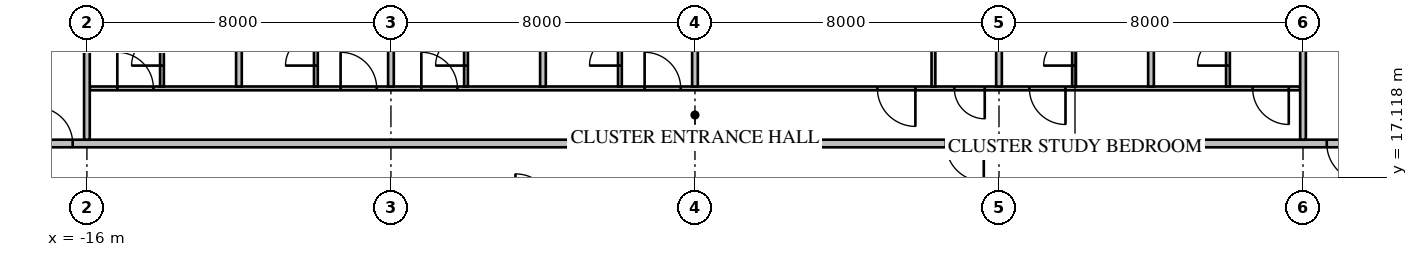
"""IFC4 building model, lengths in metres.
Left out: names, types, materials, properties, quantities, classifications, styles, units other than length and angle.
Written with IfcOpenShell. Run it as: python <this file> out.ifc"""

import sys

from ifc_helpers import new_model, si_unit, direction, frame, frame_2d, origin, place, context, subcontext, project, spatial, rectangle, extrude, element, fill, save


model = new_model("IFC4")
c1 = context("Model", 3, precision=1e-05, world=origin(), true_north=direction((0.0, 1.0)))
c2 = subcontext(c1, "Body", "Model", "MODEL_VIEW")
j1 = project(units=[si_unit("LENGTHUNIT", "METRE"), si_unit("PLANEANGLEUNIT", "RADIAN")], contexts=[c1])
p1 = place(None, origin())
s1 = spatial("IfcSite", under=j1, at=p1, CompositionType="ELEMENT")
p2 = place(p1, origin())
s2 = spatial("IfcBuilding", under=s1, at=p2, CompositionType="ELEMENT")
p3 = place(p2, frame((0.0, 0.0, 35.25)))
s3 = spatial("IfcBuildingStorey", under=s2, at=p3, CompositionType="ELEMENT", Elevation=35.25)
p4 = place(p3, frame((18.0, 18.0, 0.0), z_axis=(0.0, 0.0, 1.0), x_axis=(-1.0, 0.0, 0.0)))
e1 = element("IfcWall", 1, at=p4, inside=s3, PredefinedType="PARTITIONING", context=c2, shape_type="SweptSolid", body=[
    extrude(rectangle(XDim=36.0, YDim=0.2, at=frame_2d((18.0, 0.0))), origin(), (0.0, 0.0, 1.0), 3.65),
])
p5 = place(p4, frame((10.4, 0.0, 0.0)))
e2 = element("IfcOpeningElement", 2, at=p5, cuts=e1, PredefinedType="OPENING", context=c2, shape_type="SweptSolid", body=[
    extrude(rectangle(XDim=1.0, YDim=2.1, at=frame_2d((0.5, 1.05))), frame((0.0, 0.12, 0.0), z_axis=(0.0, -1.0, 0.0), x_axis=(1.0, 0.0, 0.0)), (0.0, 0.0, 1.0), 0.24),
])
p6 = place(p4, frame((0.375, 0.0, 0.0)))
e3 = element("IfcOpeningElement", 3, at=p6, cuts=e1, PredefinedType="OPENING", context=c2, shape_type="SweptSolid", body=[
    extrude(rectangle(XDim=1.0, YDim=2.1, at=frame_2d((0.5, 1.05))), frame((0.0, 0.12, 0.0), z_axis=(0.0, -1.0, 0.0), x_axis=(1.0, 0.0, 0.0)), (0.0, 0.0, 1.0), 0.24),
])
p7 = place(p4, frame((34.375, 0.0, 0.0)))
e4 = element("IfcOpeningElement", 4, at=p7, cuts=e1, PredefinedType="OPENING", context=c2, shape_type="SweptSolid", body=[
    extrude(rectangle(XDim=0.95, YDim=2.1, at=frame_2d((0.475, 1.05))), frame((0.0, 0.12, 0.0), z_axis=(0.0, -1.0, 0.0), x_axis=(1.0, 0.0, 0.0)), (0.0, 0.0, 1.0), 0.24),
])
p8 = place(p3, frame((15.925, 19.45, 0.0), z_axis=(0.0, 0.0, 1.0), x_axis=(-1.0, 0.0, 0.0)))
e5 = element("IfcWall", 5, at=p8, inside=s3, PredefinedType="PARTITIONING", context=c2, shape_type="SweptSolid", body=[
    extrude(rectangle(XDim=31.85, YDim=0.1, at=frame_2d((15.925, 0.0))), origin(), (0.0, 0.0, 1.0), 3.65),
])
p9 = place(p8, frame((10.125, 0.0, 0.0)))
e6 = element("IfcOpeningElement", 6, at=p9, cuts=e5, PredefinedType="OPENING", context=c2, shape_type="SweptSolid", body=[
    extrude(rectangle(XDim=1.0, YDim=2.1, at=frame_2d((0.5, 1.05))), frame((0.0, 0.07, 0.0), z_axis=(0.0, -1.0, 0.0), x_axis=(1.0, 0.0, 0.0)), (0.0, 0.0, 1.0), 0.14),
])
p10 = place(p8, frame((8.3, 0.0, 0.0)))
e7 = element("IfcOpeningElement", 7, at=p10, cuts=e5, PredefinedType="OPENING", context=c2, shape_type="SweptSolid", body=[
    extrude(rectangle(XDim=0.8, YDim=2.1, at=frame_2d((0.4, 1.05))), frame((0.0, 0.07, 0.0), z_axis=(0.0, -1.0, 0.0), x_axis=(1.0, 0.0, 0.0)), (0.0, 0.0, 1.0), 0.14),
])
p11 = place(p8, frame((0.3, 0.0, 0.0)))
e8 = element("IfcOpeningElement", 8, at=p11, cuts=e5, PredefinedType="OPENING", context=c2, shape_type="SweptSolid", body=[
    extrude(rectangle(XDim=0.95, YDim=2.1, at=frame_2d((0.475, 1.05))), frame((0.0, 0.07, 0.0), z_axis=(0.0, -1.0, 0.0), x_axis=(1.0, 0.0, 0.0)), (0.0, 0.0, 1.0), 0.14),
])
p12 = place(p8, frame((6.175, 0.0, 0.0)))
e9 = element("IfcOpeningElement", 9, at=p12, cuts=e5, PredefinedType="OPENING", context=c2, shape_type="SweptSolid", body=[
    extrude(rectangle(XDim=0.95, YDim=2.1, at=frame_2d((0.475, 1.05))), frame((0.0, 0.07, 0.0), z_axis=(0.0, -1.0, 0.0), x_axis=(1.0, 0.0, 0.0)), (0.0, 0.0, 1.0), 0.14),
])
p13 = place(p8, frame((16.3, 0.0, 0.0)))
e10 = element("IfcOpeningElement", 10, at=p13, cuts=e5, PredefinedType="OPENING", context=c2, shape_type="SweptSolid", body=[
    extrude(rectangle(XDim=0.95, YDim=2.1, at=frame_2d((0.475, 1.05))), frame((0.0, 0.07, 0.0), z_axis=(0.0, -1.0, 0.0), x_axis=(1.0, 0.0, 0.0)), (0.0, 0.0, 1.0), 0.14),
])
p14 = place(p8, frame((22.175, 0.0, 0.0)))
e11 = element("IfcOpeningElement", 11, at=p14, cuts=e5, PredefinedType="OPENING", context=c2, shape_type="SweptSolid", body=[
    extrude(rectangle(XDim=0.95, YDim=2.1, at=frame_2d((0.475, 1.05))), frame((0.0, 0.07, 0.0), z_axis=(0.0, -1.0, 0.0), x_axis=(1.0, 0.0, 0.0)), (0.0, 0.0, 1.0), 0.14),
])
p15 = place(p8, frame((24.3, 0.0, 0.0)))
e12 = element("IfcOpeningElement", 12, at=p15, cuts=e5, PredefinedType="OPENING", context=c2, shape_type="SweptSolid", body=[
    extrude(rectangle(XDim=0.95, YDim=2.1, at=frame_2d((0.475, 1.05))), frame((0.0, 0.07, 0.0), z_axis=(0.0, -1.0, 0.0), x_axis=(1.0, 0.0, 0.0)), (0.0, 0.0, 1.0), 0.14),
])
p16 = place(p8, frame((30.175, 0.0, 0.0)))
e13 = element("IfcOpeningElement", 13, at=p16, cuts=e5, PredefinedType="OPENING", context=c2, shape_type="SweptSolid", body=[
    extrude(rectangle(XDim=0.95, YDim=2.1, at=frame_2d((0.475, 1.05))), frame((0.0, 0.07, 0.0), z_axis=(0.0, -1.0, 0.0), x_axis=(1.0, 0.0, 0.0)), (0.0, 0.0, 1.0), 0.14),
])
p17 = place(p3, frame((6.275, 19.5, 0.0), z_axis=(0.0, 0.0, 1.0), x_axis=(0.0, 1.0, 0.0)))
e14 = element("IfcWall", 14, at=p17, inside=s3, PredefinedType="PARTITIONING", context=c2, shape_type="SweptSolid", body=[
    extrude(rectangle(XDim=2.1, YDim=0.1, at=frame_2d((1.05, 0.0))), origin(), (0.0, 0.0, 1.0), 3.65),
])
p18 = place(p3, frame((16.0, 18.1, 0.0), z_axis=(0.0, 0.0, 1.0), x_axis=(0.0, 1.0, 0.0)))
e15 = element("IfcWall", 15, at=p18, inside=s3, PredefinedType="PARTITIONING", context=c2, shape_type="SweptSolid", body=[
    extrude(rectangle(XDim=6.589, YDim=0.15, at=frame_2d((3.295, 0.0))), origin(), (0.0, 0.0, 1.0), 3.65),
])
for number, where, z_axis, x_axis in (
    (16, (12.0, 19.5, 0.0), (0.0, 0.0, 1.0), (0.0, 1.0, 0.0)),
    (17, (8.0, 19.5, 0.0), (0.0, 0.0, 1.0), (0.0, 1.0, 0.0)),
):
    element("IfcWall", number, at=place(p3, frame(where, z_axis=z_axis, x_axis=x_axis)), inside=s3, PredefinedType="PARTITIONING", context=c2, shape_type="SweptSolid", body=[
        extrude(rectangle(XDim=5.2, YDim=0.15, at=frame_2d((2.6, 0.0))), origin(), (0.0, 0.0, 1.0), 3.65),
    ])
p19 = place(p3, frame((0.0, 19.5, 0.0), z_axis=(0.0, 0.0, 1.0), x_axis=(0.0, 1.0, 0.0)))
e18 = element("IfcWall", 18, at=p19, inside=s3, PredefinedType="PARTITIONING", context=c2, shape_type="SweptSolid", body=[
    extrude(rectangle(XDim=5.2, YDim=0.15, at=frame_2d((2.6, 0.0))), origin(), (0.0, 0.0, 1.0), 2.809),
])
for number, where, z_axis, x_axis in (
    (19, (-4.0, 19.5, 0.0), (0.0, 0.0, 1.0), (0.0, 1.0, 0.0)),
    (20, (-8.0, 19.5, 0.0), (0.0, 0.0, 1.0), (0.0, 1.0, 0.0)),
    (21, (-12.0, 19.5, 0.0), (0.0, 0.0, 1.0), (0.0, 1.0, 0.0)),
):
    element("IfcWall", number, at=place(p3, frame(where, z_axis=z_axis, x_axis=x_axis)), inside=s3, PredefinedType="PARTITIONING", context=c2, shape_type="SweptSolid", body=[
        extrude(rectangle(XDim=5.2, YDim=0.15, at=frame_2d((2.6, 0.0))), origin(), (0.0, 0.0, 1.0), 3.65),
    ])
p20 = place(p3, frame((-16.0, 18.1, 0.0), z_axis=(0.0, 0.0, 1.0), x_axis=(0.0, 1.0, 0.0)))
e22 = element("IfcWall", 22, at=p20, inside=s3, PredefinedType="PARTITIONING", context=c2, shape_type="SweptSolid", body=[
    extrude(rectangle(XDim=6.589, YDim=0.15, at=frame_2d((3.295, 0.0))), origin(), (0.0, 0.0, 1.0), 3.65),
])
p21 = place(p3, frame((14.025, 19.5, 0.0), z_axis=(0.0, 0.0, 1.0), x_axis=(0.0, 1.0, 0.0)))
e23 = element("IfcWall", 23, at=p21, inside=s3, PredefinedType="PARTITIONING", context=c2, shape_type="SweptSolid", body=[
    extrude(rectangle(XDim=2.0, YDim=0.1, at=frame_2d((1.0, 0.0))), origin(), (0.0, 0.0, 1.0), 3.65),
])
p22 = place(p21, frame((0.55, 0.0, 0.0)))
e24 = element("IfcOpeningElement", 24, at=p22, cuts=e23, PredefinedType="OPENING", context=c2, shape_type="SweptSolid", body=[
    extrude(rectangle(XDim=0.8, YDim=2.1, at=frame_2d((0.4, 1.05))), frame((0.0, 0.07, 0.0), z_axis=(0.0, -1.0, 0.0), x_axis=(1.0, 0.0, 0.0)), (0.0, 0.0, 1.0), 0.14),
])
p23 = place(p3, frame((9.975, 19.5, 0.0), z_axis=(0.0, 0.0, 1.0), x_axis=(0.0, 1.0, 0.0)))
e25 = element("IfcWall", 25, at=p23, inside=s3, PredefinedType="PARTITIONING", context=c2, shape_type="SweptSolid", body=[
    extrude(rectangle(XDim=2.0, YDim=0.1, at=frame_2d((1.0, 0.0))), origin(), (0.0, 0.0, 1.0), 3.65),
])
p24 = place(p23, frame((0.55, 0.0, 0.0)))
e26 = element("IfcOpeningElement", 26, at=p24, cuts=e25, PredefinedType="OPENING", context=c2, shape_type="SweptSolid", body=[
    extrude(rectangle(XDim=0.8, YDim=2.1, at=frame_2d((0.4, 1.05))), frame((0.0, 0.07, 0.0), z_axis=(0.0, -1.0, 0.0), x_axis=(1.0, 0.0, 0.0)), (0.0, 0.0, 1.0), 0.14),
])
p25 = place(p3, frame((-1.975, 19.5, 0.0), z_axis=(0.0, 0.0, 1.0), x_axis=(0.0, 1.0, 0.0)))
e27 = element("IfcWall", 27, at=p25, inside=s3, PredefinedType="PARTITIONING", context=c2, shape_type="SweptSolid", body=[
    extrude(rectangle(XDim=2.0, YDim=0.1, at=frame_2d((1.0, 0.0))), origin(), (0.0, 0.0, 1.0), 3.65),
])
p26 = place(p25, frame((0.55, 0.0, 0.0)))
e28 = element("IfcOpeningElement", 28, at=p26, cuts=e27, PredefinedType="OPENING", context=c2, shape_type="SweptSolid", body=[
    extrude(rectangle(XDim=0.8, YDim=2.1, at=frame_2d((0.4, 1.05))), frame((0.0, 0.07, 0.0), z_axis=(0.0, -1.0, 0.0), x_axis=(1.0, 0.0, 0.0)), (0.0, 0.0, 1.0), 0.14),
])
p27 = place(p3, frame((-6.025, 19.5, 0.0), z_axis=(0.0, 0.0, 1.0), x_axis=(0.0, 1.0, 0.0)))
e29 = element("IfcWall", 29, at=p27, inside=s3, PredefinedType="PARTITIONING", context=c2, shape_type="SweptSolid", body=[
    extrude(rectangle(XDim=2.0, YDim=0.1, at=frame_2d((1.0, 0.0))), origin(), (0.0, 0.0, 1.0), 3.65),
])
p28 = place(p27, frame((0.55, 0.0, 0.0)))
e30 = element("IfcOpeningElement", 30, at=p28, cuts=e29, PredefinedType="OPENING", context=c2, shape_type="SweptSolid", body=[
    extrude(rectangle(XDim=0.8, YDim=2.1, at=frame_2d((0.4, 1.05))), frame((0.0, 0.07, 0.0), z_axis=(0.0, -1.0, 0.0), x_axis=(1.0, 0.0, 0.0)), (0.0, 0.0, 1.0), 0.14),
])
p29 = place(p3, frame((-9.975, 19.5, 0.0), z_axis=(0.0, 0.0, 1.0), x_axis=(0.0, 1.0, 0.0)))
e31 = element("IfcWall", 31, at=p29, inside=s3, PredefinedType="PARTITIONING", context=c2, shape_type="SweptSolid", body=[
    extrude(rectangle(XDim=2.0, YDim=0.1, at=frame_2d((1.0, 0.0))), origin(), (0.0, 0.0, 1.0), 3.65),
])
p30 = place(p29, frame((0.55, 0.0, 0.0)))
e32 = element("IfcOpeningElement", 32, at=p30, cuts=e31, PredefinedType="OPENING", context=c2, shape_type="SweptSolid", body=[
    extrude(rectangle(XDim=0.8, YDim=2.1, at=frame_2d((0.4, 1.05))), frame((0.0, 0.07, 0.0), z_axis=(0.0, -1.0, 0.0), x_axis=(1.0, 0.0, 0.0)), (0.0, 0.0, 1.0), 0.14),
])
p31 = place(p3, frame((-14.025, 19.5, 0.0), z_axis=(0.0, 0.0, 1.0), x_axis=(0.0, 1.0, 0.0)))
e33 = element("IfcWall", 33, at=p31, inside=s3, PredefinedType="PARTITIONING", context=c2, shape_type="SweptSolid", body=[
    extrude(rectangle(XDim=2.0, YDim=0.1, at=frame_2d((1.0, 0.0))), origin(), (0.0, 0.0, 1.0), 3.65),
])
p32 = place(p31, frame((0.55, 0.0, 0.0)))
e34 = element("IfcOpeningElement", 34, at=p32, cuts=e33, PredefinedType="OPENING", context=c2, shape_type="SweptSolid", body=[
    extrude(rectangle(XDim=0.8, YDim=2.1, at=frame_2d((0.4, 1.05))), frame((0.0, 0.07, 0.0), z_axis=(0.0, -1.0, 0.0), x_axis=(1.0, 0.0, 0.0)), (0.0, 0.0, 1.0), 0.14),
])
p33 = place(p5, origin())
e35 = element("IfcDoor", 35, at=p33, inside=s3, OperationType="SINGLE_SWING_LEFT", PredefinedType="DOOR", context=c2, shape_type="SweptSolid", body=[
    extrude(rectangle(XDim=1.0, YDim=2.1, at=frame_2d((0.5, 1.05))), frame((0.0, 0.025, 0.0), z_axis=(0.0, -1.0, 0.0), x_axis=(1.0, 0.0, 0.0)), (0.0, 0.0, 1.0), 0.05),
])
fill(e2, e35)
p34 = place(p9, origin())
e36 = element("IfcDoor", 36, at=p34, inside=s3, OperationType="SINGLE_SWING_LEFT", PredefinedType="DOOR", context=c2, shape_type="SweptSolid", body=[
    extrude(rectangle(XDim=1.0, YDim=2.1, at=frame_2d((0.5, 1.05))), frame((0.0, 0.025, 0.0), z_axis=(0.0, -1.0, 0.0), x_axis=(1.0, 0.0, 0.0)), (0.0, 0.0, 1.0), 0.05),
])
fill(e6, e36)
p35 = place(p10, origin())
e37 = element("IfcDoor", 37, at=p35, inside=s3, OperationType="SINGLE_SWING_LEFT", PredefinedType="DOOR", context=c2, shape_type="SweptSolid", body=[
    extrude(rectangle(XDim=0.8, YDim=2.1, at=frame_2d((0.4, 1.05))), frame((0.0, 0.025, 0.0), z_axis=(0.0, -1.0, 0.0), x_axis=(1.0, 0.0, 0.0)), (0.0, 0.0, 1.0), 0.05),
])
fill(e7, e37)
p36 = place(p6, origin())
e38 = element("IfcDoor", 38, at=p36, inside=s3, OperationType="SINGLE_SWING_LEFT", PredefinedType="DOOR", context=c2, shape_type="SweptSolid", body=[
    extrude(rectangle(XDim=1.0, YDim=2.1, at=frame_2d((0.5, 1.05))), frame((0.0, 0.025, 0.0), z_axis=(0.0, -1.0, 0.0), x_axis=(1.0, 0.0, 0.0)), (0.0, 0.0, 1.0), 0.05),
])
fill(e3, e38)
p37 = place(p11, origin())
e39 = element("IfcDoor", 39, at=p37, inside=s3, OperationType="SINGLE_SWING_LEFT", PredefinedType="DOOR", context=c2, shape_type="SweptSolid", body=[
    extrude(rectangle(XDim=0.95, YDim=2.1, at=frame_2d((0.475, 1.05))), frame((0.0, 0.025, 0.0), z_axis=(0.0, -1.0, 0.0), x_axis=(1.0, 0.0, 0.0)), (0.0, 0.0, 1.0), 0.05),
])
fill(e8, e39)
p38 = place(p22, origin())
e40 = element("IfcDoor", 40, at=p38, inside=s3, OperationType="SINGLE_SWING_LEFT", PredefinedType="DOOR", context=c2, shape_type="SweptSolid", body=[
    extrude(rectangle(XDim=0.8, YDim=2.1, at=frame_2d((0.4, 1.05))), frame((0.0, 0.025, 0.0), z_axis=(0.0, -1.0, 0.0), x_axis=(1.0, 0.0, 0.0)), (0.0, 0.0, 1.0), 0.05),
])
fill(e24, e40)
p39 = place(p12, origin())
e41 = element("IfcDoor", 41, at=p39, inside=s3, OperationType="SINGLE_SWING_LEFT", PredefinedType="DOOR", context=c2, shape_type="SweptSolid", body=[
    extrude(rectangle(XDim=0.95, YDim=2.1, at=frame_2d((0.475, 1.05))), frame((0.0, 0.025, 0.0), z_axis=(0.0, -1.0, 0.0), x_axis=(1.0, 0.0, 0.0)), (0.0, 0.0, 1.0), 0.05),
])
fill(e9, e41)
p40 = place(p24, origin())
e42 = element("IfcDoor", 42, at=p40, inside=s3, OperationType="SINGLE_SWING_LEFT", PredefinedType="DOOR", context=c2, shape_type="SweptSolid", body=[
    extrude(rectangle(XDim=0.8, YDim=2.1, at=frame_2d((0.4, 1.05))), frame((0.0, 0.025, 0.0), z_axis=(0.0, -1.0, 0.0), x_axis=(1.0, 0.0, 0.0)), (0.0, 0.0, 1.0), 0.05),
])
fill(e26, e42)
p41 = place(p13, origin())
e43 = element("IfcDoor", 43, at=p41, inside=s3, OperationType="SINGLE_SWING_RIGHT", PredefinedType="DOOR", context=c2, shape_type="SweptSolid", body=[
    extrude(rectangle(XDim=0.95, YDim=2.1, at=frame_2d((0.475, 1.05))), frame((0.0, 0.025, 0.0), z_axis=(0.0, -1.0, 0.0), x_axis=(1.0, 0.0, 0.0)), (0.0, 0.0, 1.0), 0.05),
])
fill(e10, e43)
p42 = place(p26, origin())
e44 = element("IfcDoor", 44, at=p42, inside=s3, OperationType="SINGLE_SWING_LEFT", PredefinedType="DOOR", context=c2, shape_type="SweptSolid", body=[
    extrude(rectangle(XDim=0.8, YDim=2.1, at=frame_2d((0.4, 1.05))), frame((0.0, 0.025, 0.0), z_axis=(0.0, -1.0, 0.0), x_axis=(1.0, 0.0, 0.0)), (0.0, 0.0, 1.0), 0.05),
])
fill(e28, e44)
p43 = place(p14, origin())
e45 = element("IfcDoor", 45, at=p43, inside=s3, OperationType="SINGLE_SWING_RIGHT", PredefinedType="DOOR", context=c2, shape_type="SweptSolid", body=[
    extrude(rectangle(XDim=0.95, YDim=2.1, at=frame_2d((0.475, 1.05))), frame((0.0, 0.025, 0.0), z_axis=(0.0, -1.0, 0.0), x_axis=(1.0, 0.0, 0.0)), (0.0, 0.0, 1.0), 0.05),
])
fill(e11, e45)
p44 = place(p28, origin())
e46 = element("IfcDoor", 46, at=p44, inside=s3, OperationType="SINGLE_SWING_LEFT", PredefinedType="DOOR", context=c2, shape_type="SweptSolid", body=[
    extrude(rectangle(XDim=0.8, YDim=2.1, at=frame_2d((0.4, 1.05))), frame((0.0, 0.025, 0.0), z_axis=(0.0, -1.0, 0.0), x_axis=(1.0, 0.0, 0.0)), (0.0, 0.0, 1.0), 0.05),
])
fill(e30, e46)
p45 = place(p15, origin())
e47 = element("IfcDoor", 47, at=p45, inside=s3, OperationType="SINGLE_SWING_RIGHT", PredefinedType="DOOR", context=c2, shape_type="SweptSolid", body=[
    extrude(rectangle(XDim=0.95, YDim=2.1, at=frame_2d((0.475, 1.05))), frame((0.0, 0.025, 0.0), z_axis=(0.0, -1.0, 0.0), x_axis=(1.0, 0.0, 0.0)), (0.0, 0.0, 1.0), 0.05),
])
fill(e12, e47)
p46 = place(p30, origin())
e48 = element("IfcDoor", 48, at=p46, inside=s3, OperationType="SINGLE_SWING_LEFT", PredefinedType="DOOR", context=c2, shape_type="SweptSolid", body=[
    extrude(rectangle(XDim=0.8, YDim=2.1, at=frame_2d((0.4, 1.05))), frame((0.0, 0.025, 0.0), z_axis=(0.0, -1.0, 0.0), x_axis=(1.0, 0.0, 0.0)), (0.0, 0.0, 1.0), 0.05),
])
fill(e32, e48)
p47 = place(p16, origin())
e49 = element("IfcDoor", 49, at=p47, inside=s3, OperationType="SINGLE_SWING_RIGHT", PredefinedType="DOOR", context=c2, shape_type="SweptSolid", body=[
    extrude(rectangle(XDim=0.95, YDim=2.1, at=frame_2d((0.475, 1.05))), frame((0.0, 0.025, 0.0), z_axis=(0.0, -1.0, 0.0), x_axis=(1.0, 0.0, 0.0)), (0.0, 0.0, 1.0), 0.05),
])
fill(e13, e49)
p48 = place(p32, origin())
e50 = element("IfcDoor", 50, at=p48, inside=s3, OperationType="SINGLE_SWING_LEFT", PredefinedType="DOOR", context=c2, shape_type="SweptSolid", body=[
    extrude(rectangle(XDim=0.8, YDim=2.1, at=frame_2d((0.4, 1.05))), frame((0.0, 0.025, 0.0), z_axis=(0.0, -1.0, 0.0), x_axis=(1.0, 0.0, 0.0)), (0.0, 0.0, 1.0), 0.05),
])
fill(e34, e50)
p49 = place(p7, origin())
e51 = element("IfcDoor", 51, at=p49, inside=s3, OperationType="SINGLE_SWING_RIGHT", PredefinedType="DOOR", context=c2, shape_type="SweptSolid", body=[
    extrude(rectangle(XDim=0.95, YDim=2.1, at=frame_2d((0.475, 1.05))), frame((0.0, 0.025, 0.0), z_axis=(0.0, -1.0, 0.0), x_axis=(1.0, 0.0, 0.0)), (0.0, 0.0, 1.0), 0.05),
])
fill(e4, e51)
save(model, sys.argv[1])
